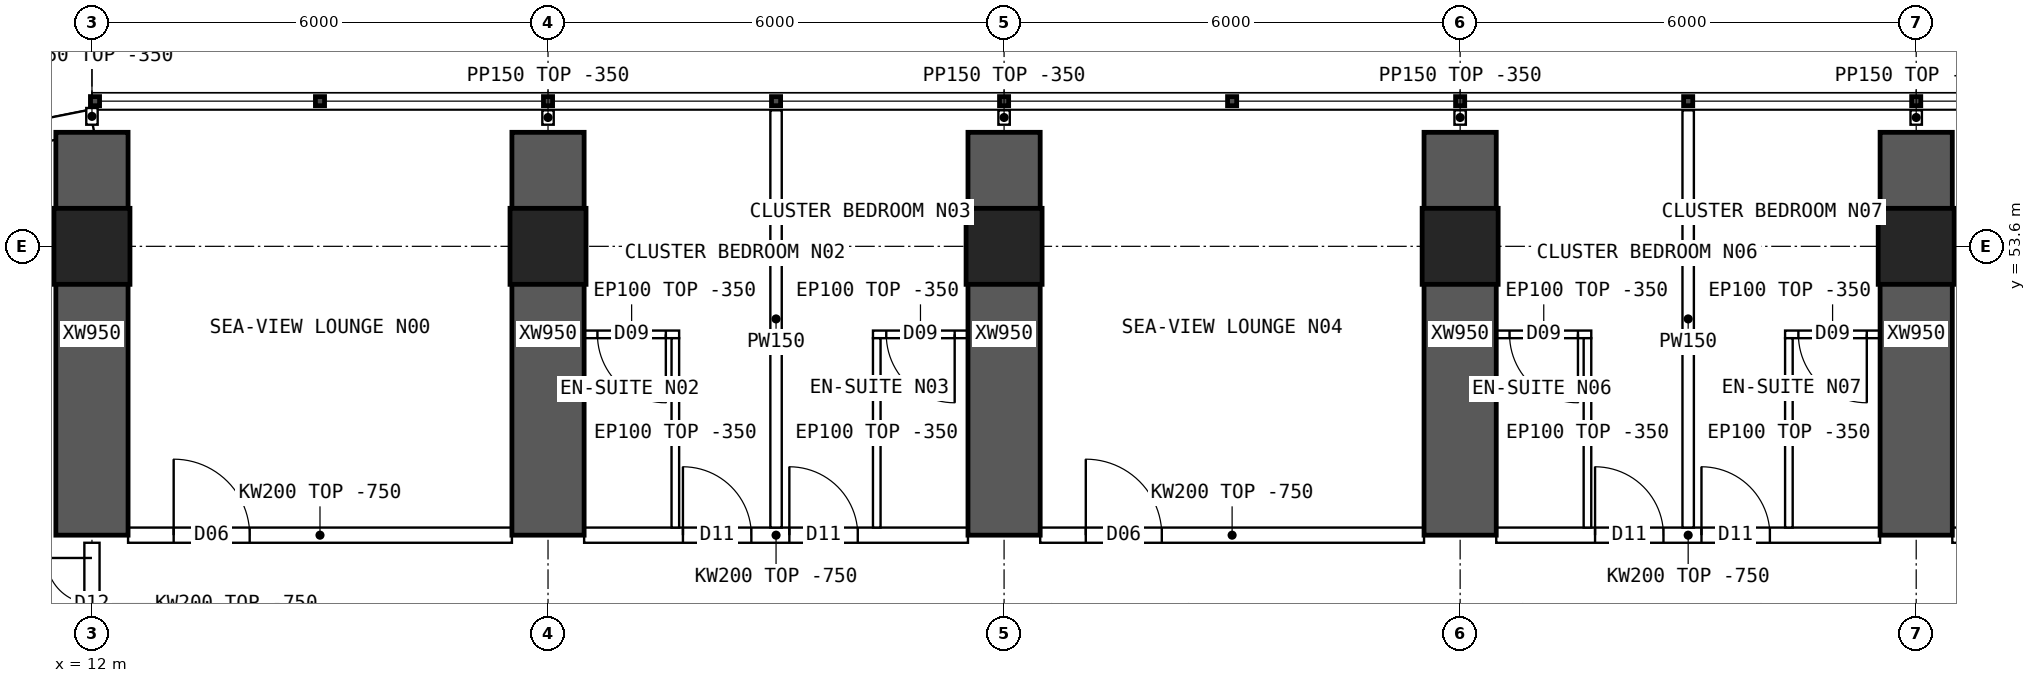
"""IFC4 building model, lengths in metres.
Left out: names, types, materials, properties, quantities, classifications, styles, units other than length and angle.
Written with IfcOpenShell. Run it as: python <this file> out.ifc"""

import sys

from ifc_helpers import new_model, si_unit, direction, frame, frame_2d, origin, origin_2d, place, context, subcontext, project, spatial, polyline, rectangle, hollow_rectangle, outline, extrude, element, fill, save


model = new_model("IFC4")
c1 = context("Model", 3, precision=1e-05, world=origin(), true_north=direction((0.0, 1.0)))
c2 = subcontext(c1, "Body", "Model", "MODEL_VIEW")
j1 = project(units=[si_unit("LENGTHUNIT", "METRE"), si_unit("PLANEANGLEUNIT", "RADIAN")], contexts=[c1])
p1 = place(None, origin())
s1 = spatial("IfcSite", under=j1, at=p1, CompositionType="ELEMENT")
p2 = place(p1, origin())
s2 = spatial("IfcBuilding", under=s1, at=p2, CompositionType="ELEMENT")
p3 = place(p2, frame((0.0, 0.0, 129.4)))
s3 = spatial("IfcBuildingStorey", under=s2, at=p3, CompositionType="ELEMENT", Elevation=129.4)
for number, where, z_axis, x_axis in (
    (1, (12.0, 53.6, 0.0), (0.0, 0.0, 1.0), (1.0, 0.0, 0.0)),
    (2, (18.0, 53.6, 0.0), (0.0, 0.0, 1.0), (1.0, 0.0, 0.0)),
    (3, (24.0, 53.6, 0.0), (0.0, 0.0, 1.0), (1.0, 0.0, 0.0)),
    (4, (30.0, 53.6, 0.0), (0.0, 0.0, 1.0), (1.0, 0.0, 0.0)),
    (5, (36.0, 53.6, 0.0), (0.0, 0.0, 1.0), (1.0, 0.0, 0.0)),
):
    element("IfcColumn", number, at=place(p3, frame(where, z_axis=z_axis, x_axis=x_axis)), inside=s3, PredefinedType="COLUMN", context=c2, shape_type="SweptSolid", body=[
        extrude(hollow_rectangle(XDim=1.0, YDim=1.0, WallThickness=0.1, at=origin_2d()), origin(), (0.0, 0.0, 1.0), 3.75),
    ])
for number, where, z_axis, x_axis in (
    (6, (12.0, 49.8, 0.0), (0.0, 0.0, 1.0), (0.0, 1.0, 0.0)),
    (7, (18.0, 49.8, 0.0), (0.0, 0.0, 1.0), (0.0, 1.0, 0.0)),
    (8, (24.0, 49.8, 0.0), (0.0, 0.0, 1.0), (0.0, 1.0, 0.0)),
    (9, (30.0, 49.8, 0.0), (0.0, 0.0, 1.0), (0.0, 1.0, 0.0)),
    (10, (36.0, 49.8, 0.0), (0.0, 0.0, 1.0), (0.0, 1.0, 0.0)),
):
    element("IfcWall", number, at=place(p3, frame(where, z_axis=z_axis, x_axis=x_axis)), inside=s3, PredefinedType="SHEAR", context=c2, shape_type="SweptSolid", body=[
        extrude(rectangle(XDim=5.3, YDim=0.95, at=frame_2d((2.65, 0.0))), origin(), (0.0, 0.0, 1.0), 3.75),
    ])
p4 = place(p3, frame((12.0, 55.25, 0.0), z_axis=(0.0, 0.0, 1.0), x_axis=(-0.980787251524, -0.195080412259, 0.0)))
e11 = element("IfcWall", 11, at=p4, inside=s3, PredefinedType="SOLIDWALL", context=c2, shape_type="SweptSolid", body=[
    extrude(outline(polyline([(-0.03, -0.15), (3.249, -0.15), (3.189, 0.15), (0.03, 0.15), (-0.03, -0.15)])), origin(), (0.0, 0.0, 1.0), 3.4),
])
p5 = place(p4, frame((0.909, 0.0, 0.9)))
e12 = element("IfcOpeningElement", 12, at=p5, cuts=e11, PredefinedType="OPENING", context=c2, shape_type="SweptSolid", body=[
    extrude(rectangle(XDim=1.4, YDim=1.8, at=frame_2d((0.7, 0.9))), frame((0.0, 0.16, 0.0), z_axis=(0.0, -1.0, 0.0), x_axis=(1.0, 0.0, 0.0)), (0.0, 0.0, 1.0), 0.32),
])
p6 = place(p3, frame((12.475, 49.8, 0.0), z_axis=(0.0, 0.0, 1.0), x_axis=(1.0, 0.0, 0.0)))
e13 = element("IfcWall", 13, at=p6, inside=s3, PredefinedType="SOLIDWALL", context=c2, shape_type="SweptSolid", body=[
    extrude(outline(polyline([(0.0, 0.0), (5.05, 0.0), (5.05, 3.0), (0.0, 3.0), (0.0, 0.0)])), frame((0.0, 0.1, 0.0), z_axis=(0.0, -1.0, 0.0), x_axis=(1.0, 0.0, 0.0)), (0.0, 0.0, 1.0), 0.2),
])
p7 = place(p6, frame((0.6, 0.0, 0.0)))
e14 = element("IfcOpeningElement", 14, at=p7, cuts=e13, PredefinedType="OPENING", context=c2, shape_type="SweptSolid", body=[
    extrude(rectangle(XDim=1.0, YDim=2.1, at=frame_2d((0.5, 1.05))), frame((0.0, 0.11, 0.0), z_axis=(0.0, -1.0, 0.0), x_axis=(1.0, 0.0, 0.0)), (0.0, 0.0, 1.0), 0.22),
])
p8 = place(p3, frame((18.475, 49.8, 0.0), z_axis=(0.0, 0.0, 1.0), x_axis=(1.0, 0.0, 0.0)))
e15 = element("IfcWall", 15, at=p8, inside=s3, PredefinedType="SOLIDWALL", context=c2, shape_type="SweptSolid", body=[
    extrude(outline(polyline([(0.0, 0.0), (5.05, 0.0), (5.05, 3.0), (0.0, 3.0), (0.0, 0.0)])), frame((0.0, 0.1, 0.0), z_axis=(0.0, -1.0, 0.0), x_axis=(1.0, 0.0, 0.0)), (0.0, 0.0, 1.0), 0.2),
])
p9 = place(p8, frame((1.3, 0.0, 0.0)))
e16 = element("IfcOpeningElement", 16, at=p9, cuts=e15, PredefinedType="OPENING", context=c2, shape_type="SweptSolid", body=[
    extrude(rectangle(XDim=0.9, YDim=2.1, at=frame_2d((0.45, 1.05))), frame((0.0, 0.11, 0.0), z_axis=(0.0, -1.0, 0.0), x_axis=(1.0, 0.0, 0.0)), (0.0, 0.0, 1.0), 0.22),
])
p10 = place(p8, frame((2.7, 0.0, 0.0)))
e17 = element("IfcOpeningElement", 17, at=p10, cuts=e15, PredefinedType="OPENING", context=c2, shape_type="SweptSolid", body=[
    extrude(rectangle(XDim=0.9, YDim=2.1, at=frame_2d((0.45, 1.05))), frame((0.0, 0.11, 0.0), z_axis=(0.0, -1.0, 0.0), x_axis=(1.0, 0.0, 0.0)), (0.0, 0.0, 1.0), 0.22),
])
p11 = place(p3, frame((24.475, 49.8, 0.0), z_axis=(0.0, 0.0, 1.0), x_axis=(1.0, 0.0, 0.0)))
e18 = element("IfcWall", 18, at=p11, inside=s3, PredefinedType="SOLIDWALL", context=c2, shape_type="SweptSolid", body=[
    extrude(outline(polyline([(0.0, 0.0), (5.05, 0.0), (5.05, 3.0), (0.0, 3.0), (0.0, 0.0)])), frame((0.0, 0.1, 0.0), z_axis=(0.0, -1.0, 0.0), x_axis=(1.0, 0.0, 0.0)), (0.0, 0.0, 1.0), 0.2),
])
p12 = place(p11, frame((0.6, 0.0, 0.0)))
e19 = element("IfcOpeningElement", 19, at=p12, cuts=e18, PredefinedType="OPENING", context=c2, shape_type="SweptSolid", body=[
    extrude(rectangle(XDim=1.0, YDim=2.1, at=frame_2d((0.5, 1.05))), frame((0.0, 0.11, 0.0), z_axis=(0.0, -1.0, 0.0), x_axis=(1.0, 0.0, 0.0)), (0.0, 0.0, 1.0), 0.22),
])
p13 = place(p3, frame((30.475, 49.8, 0.0), z_axis=(0.0, 0.0, 1.0), x_axis=(1.0, 0.0, 0.0)))
e20 = element("IfcWall", 20, at=p13, inside=s3, PredefinedType="SOLIDWALL", context=c2, shape_type="SweptSolid", body=[
    extrude(outline(polyline([(0.0, 0.0), (5.05, 0.0), (5.05, 3.0), (0.0, 3.0), (0.0, 0.0)])), frame((0.0, 0.1, 0.0), z_axis=(0.0, -1.0, 0.0), x_axis=(1.0, 0.0, 0.0)), (0.0, 0.0, 1.0), 0.2),
])
p14 = place(p13, frame((1.3, 0.0, 0.0)))
e21 = element("IfcOpeningElement", 21, at=p14, cuts=e20, PredefinedType="OPENING", context=c2, shape_type="SweptSolid", body=[
    extrude(rectangle(XDim=0.9, YDim=2.1, at=frame_2d((0.45, 1.05))), frame((0.0, 0.11, 0.0), z_axis=(0.0, -1.0, 0.0), x_axis=(1.0, 0.0, 0.0)), (0.0, 0.0, 1.0), 0.22),
])
p15 = place(p13, frame((2.7, 0.0, 0.0)))
e22 = element("IfcOpeningElement", 22, at=p15, cuts=e20, PredefinedType="OPENING", context=c2, shape_type="SweptSolid", body=[
    extrude(rectangle(XDim=0.9, YDim=2.1, at=frame_2d((0.45, 1.05))), frame((0.0, 0.11, 0.0), z_axis=(0.0, -1.0, 0.0), x_axis=(1.0, 0.0, 0.0)), (0.0, 0.0, 1.0), 0.22),
])
p16 = place(p3, frame((36.475, 49.8, 0.0), z_axis=(0.0, 0.0, 1.0), x_axis=(1.0, 0.0, 0.0)))
e23 = element("IfcWall", 23, at=p16, inside=s3, PredefinedType="SOLIDWALL", context=c2, shape_type="SweptSolid", body=[
    extrude(outline(polyline([(0.0, 0.0), (5.05, 0.0), (5.05, 3.0), (0.0, 3.0), (0.0, 0.0)])), frame((0.0, 0.1, 0.0), z_axis=(0.0, -1.0, 0.0), x_axis=(1.0, 0.0, 0.0)), (0.0, 0.0, 1.0), 0.2),
])
p17 = place(p16, frame((0.3, 0.0, 0.0)))
e24 = element("IfcOpeningElement", 24, at=p17, cuts=e23, PredefinedType="OPENING", context=c2, shape_type="SweptSolid", body=[
    extrude(rectangle(XDim=1.0, YDim=2.1, at=frame_2d((0.5, 1.05))), frame((0.0, 0.11, 0.0), z_axis=(0.0, -1.0, 0.0), x_axis=(1.0, 0.0, 0.0)), (0.0, 0.0, 1.0), 0.22),
])
p18 = place(p3, frame((21.0, 55.39, 0.0), z_axis=(0.0, 0.0, 1.0), x_axis=(0.0, -1.0, 0.0)))
e25 = element("IfcWall", 25, at=p18, inside=s3, PredefinedType="PARTITIONING", context=c2, shape_type="SweptSolid", body=[
    extrude(outline(polyline([(0.0, 0.0), (5.49, 0.0), (5.49, 3.0), (5.442, 3.0), (5.44, 3.4), (1.992, 3.4), (1.99, 3.0), (1.592, 3.0), (1.59, 3.4), (0.0, 3.4), (0.0, 0.0)])), frame((0.0, 0.075, 0.0), z_axis=(0.0, -1.0, 0.0), x_axis=(1.0, 0.0, 0.0)), (0.0, 0.0, 1.0), 0.15),
])
p19 = place(p3, frame((18.475, 52.442, 0.0), z_axis=(0.0, 0.0, 1.0), x_axis=(1.0, 0.0, 0.0)))
e26 = element("IfcWall", 26, at=p19, inside=s3, PredefinedType="PARTITIONING", context=c2, shape_type="SweptSolid", body=[
    extrude(rectangle(XDim=1.25, YDim=0.1, at=frame_2d((0.625, 0.0))), origin(), (0.0, 0.0, 1.0), 3.4),
])
p20 = place(p19, frame((0.175, 0.0, 0.0)))
e27 = element("IfcOpeningElement", 27, at=p20, cuts=e26, PredefinedType="OPENING", context=c2, shape_type="SweptSolid", body=[
    extrude(rectangle(XDim=0.9, YDim=2.1, at=frame_2d((0.45, 1.05))), frame((0.0, 0.06, 0.0), z_axis=(0.0, -1.0, 0.0), x_axis=(1.0, 0.0, 0.0)), (0.0, 0.0, 1.0), 0.12),
])
p21 = place(p3, frame((19.675, 52.392, 0.0), z_axis=(0.0, 0.0, 1.0), x_axis=(0.0, -1.0, 0.0)))
e28 = element("IfcWall", 28, at=p21, inside=s3, PredefinedType="PARTITIONING", context=c2, shape_type="SweptSolid", body=[
    extrude(outline(polyline([(0.0, 0.0), (2.492, 0.0), (2.492, 3.0), (2.444, 3.0), (2.442, 3.4), (0.0, 3.4), (0.0, 0.0)])), frame((0.0, 0.05, 0.0), z_axis=(0.0, -1.0, 0.0), x_axis=(1.0, 0.0, 0.0)), (0.0, 0.0, 1.0), 0.1),
])
p22 = place(p3, frame((22.275, 52.442, 0.0), z_axis=(0.0, 0.0, 1.0), x_axis=(1.0, 0.0, 0.0)))
e29 = element("IfcWall", 29, at=p22, inside=s3, PredefinedType="PARTITIONING", context=c2, shape_type="SweptSolid", body=[
    extrude(rectangle(XDim=1.25, YDim=0.1, at=frame_2d((0.625, 0.0))), origin(), (0.0, 0.0, 1.0), 3.4),
])
p23 = place(p22, frame((0.175, 0.0, 0.0)))
e30 = element("IfcOpeningElement", 30, at=p23, cuts=e29, PredefinedType="OPENING", context=c2, shape_type="SweptSolid", body=[
    extrude(rectangle(XDim=0.9, YDim=2.1, at=frame_2d((0.45, 1.05))), frame((0.0, 0.06, 0.0), z_axis=(0.0, -1.0, 0.0), x_axis=(1.0, 0.0, 0.0)), (0.0, 0.0, 1.0), 0.12),
])
p24 = place(p3, frame((22.325, 52.392, 0.0), z_axis=(0.0, 0.0, 1.0), x_axis=(0.0, -1.0, 0.0)))
e31 = element("IfcWall", 31, at=p24, inside=s3, PredefinedType="PARTITIONING", context=c2, shape_type="SweptSolid", body=[
    extrude(outline(polyline([(0.0, 0.0), (2.492, 0.0), (2.492, 3.0), (2.444, 3.0), (2.442, 3.4), (0.0, 3.4), (0.0, 0.0)])), frame((0.0, 0.05, 0.0), z_axis=(0.0, -1.0, 0.0), x_axis=(1.0, 0.0, 0.0)), (0.0, 0.0, 1.0), 0.1),
])
p25 = place(p3, frame((33.0, 55.39, 0.0), z_axis=(0.0, 0.0, 1.0), x_axis=(0.0, -1.0, 0.0)))
e32 = element("IfcWall", 32, at=p25, inside=s3, PredefinedType="PARTITIONING", context=c2, shape_type="SweptSolid", body=[
    extrude(outline(polyline([(0.0, 0.0), (5.49, 0.0), (5.49, 3.0), (5.442, 3.0), (5.44, 3.4), (1.992, 3.4), (1.99, 3.0), (1.592, 3.0), (1.59, 3.4), (0.0, 3.4), (0.0, 0.0)])), frame((0.0, 0.075, 0.0), z_axis=(0.0, -1.0, 0.0), x_axis=(1.0, 0.0, 0.0)), (0.0, 0.0, 1.0), 0.15),
])
p26 = place(p3, frame((30.475, 52.442, 0.0), z_axis=(0.0, 0.0, 1.0), x_axis=(1.0, 0.0, 0.0)))
e33 = element("IfcWall", 33, at=p26, inside=s3, PredefinedType="PARTITIONING", context=c2, shape_type="SweptSolid", body=[
    extrude(rectangle(XDim=1.25, YDim=0.1, at=frame_2d((0.625, 0.0))), origin(), (0.0, 0.0, 1.0), 3.4),
])
p27 = place(p26, frame((0.175, 0.0, 0.0)))
e34 = element("IfcOpeningElement", 34, at=p27, cuts=e33, PredefinedType="OPENING", context=c2, shape_type="SweptSolid", body=[
    extrude(rectangle(XDim=0.9, YDim=2.1, at=frame_2d((0.45, 1.05))), frame((0.0, 0.06, 0.0), z_axis=(0.0, -1.0, 0.0), x_axis=(1.0, 0.0, 0.0)), (0.0, 0.0, 1.0), 0.12),
])
p28 = place(p3, frame((31.675, 52.392, 0.0), z_axis=(0.0, 0.0, 1.0), x_axis=(0.0, -1.0, 0.0)))
e35 = element("IfcWall", 35, at=p28, inside=s3, PredefinedType="PARTITIONING", context=c2, shape_type="SweptSolid", body=[
    extrude(outline(polyline([(0.0, 0.0), (2.492, 0.0), (2.492, 3.0), (2.444, 3.0), (2.442, 3.4), (0.0, 3.4), (0.0, 0.0)])), frame((0.0, 0.05, 0.0), z_axis=(0.0, -1.0, 0.0), x_axis=(1.0, 0.0, 0.0)), (0.0, 0.0, 1.0), 0.1),
])
p29 = place(p3, frame((34.275, 52.442, 0.0), z_axis=(0.0, 0.0, 1.0), x_axis=(1.0, 0.0, 0.0)))
e36 = element("IfcWall", 36, at=p29, inside=s3, PredefinedType="PARTITIONING", context=c2, shape_type="SweptSolid", body=[
    extrude(rectangle(XDim=1.25, YDim=0.1, at=frame_2d((0.625, 0.0))), origin(), (0.0, 0.0, 1.0), 3.4),
])
p30 = place(p29, frame((0.175, 0.0, 0.0)))
e37 = element("IfcOpeningElement", 37, at=p30, cuts=e36, PredefinedType="OPENING", context=c2, shape_type="SweptSolid", body=[
    extrude(rectangle(XDim=0.9, YDim=2.1, at=frame_2d((0.45, 1.05))), frame((0.0, 0.06, 0.0), z_axis=(0.0, -1.0, 0.0), x_axis=(1.0, 0.0, 0.0)), (0.0, 0.0, 1.0), 0.12),
])
p31 = place(p3, frame((34.325, 52.392, 0.0), z_axis=(0.0, 0.0, 1.0), x_axis=(0.0, -1.0, 0.0)))
e38 = element("IfcWall", 38, at=p31, inside=s3, PredefinedType="PARTITIONING", context=c2, shape_type="SweptSolid", body=[
    extrude(outline(polyline([(0.0, 0.0), (2.492, 0.0), (2.492, 3.0), (2.444, 3.0), (2.442, 3.4), (0.0, 3.4), (0.0, 0.0)])), frame((0.0, 0.05, 0.0), z_axis=(0.0, -1.0, 0.0), x_axis=(1.0, 0.0, 0.0)), (0.0, 0.0, 1.0), 0.1),
])
p32 = place(p3, frame((12.0, 48.1, 0.0), z_axis=(0.0, 0.0, 1.0), x_axis=(0.0, 1.0, 0.0)))
e39 = element("IfcWall", 39, at=p32, inside=s3, PredefinedType="SOLIDWALL", context=c2, shape_type="SweptSolid", body=[
    extrude(outline(polyline([(0.0, 0.0), (1.6, 0.0), (1.6, 3.0), (0.0, 3.0), (0.0, 0.0)])), frame((0.0, 0.1, 0.0), z_axis=(0.0, -1.0, 0.0), x_axis=(1.0, 0.0, 0.0)), (0.0, 0.0, 1.0), 0.2),
])
p33 = place(p32, frame((0.2, 0.0, 0.0)))
e40 = element("IfcOpeningElement", 40, at=p33, cuts=e39, PredefinedType="OPENING", context=c2, shape_type="SweptSolid", body=[
    extrude(rectangle(XDim=1.2, YDim=2.1, at=frame_2d((0.6, 1.05))), frame((0.0, 0.11, 0.0), z_axis=(0.0, -1.0, 0.0), x_axis=(1.0, 0.0, 0.0)), (0.0, 0.0, 1.0), 0.22),
])
p34 = place(p3, frame((12.0, 55.2, 0.0), z_axis=(0.0, 0.0, 1.0), x_axis=(0.0, 1.0, 0.0)))
e41 = element("IfcWall", 41, at=p34, inside=s3, PredefinedType="PARTITIONING", context=c2, shape_type="SweptSolid", body=[
    extrude(rectangle(XDim=0.22, YDim=0.15, at=frame_2d((0.11, 0.0))), origin(), (0.0, 0.0, 1.0), 3.4),
])
for number, where, z_axis, x_axis in (
    (42, (18.0, 55.2, 0.0), (0.0, 0.0, 1.0), (0.0, 1.0, 0.0)),
    (43, (24.0, 55.2, 0.0), (0.0, 0.0, 1.0), (0.0, 1.0, 0.0)),
    (44, (30.0, 55.2, 0.0), (0.0, 0.0, 1.0), (0.0, 1.0, 0.0)),
    (45, (36.0, 55.2, 0.0), (0.0, 0.0, 1.0), (0.0, 1.0, 0.0)),
):
    element("IfcWall", number, at=place(p3, frame(where, z_axis=z_axis, x_axis=x_axis)), inside=s3, PredefinedType="PARTITIONING", context=c2, shape_type="SweptSolid", body=[
        extrude(rectangle(XDim=0.19, YDim=0.15, at=frame_2d((0.095, 0.0))), origin(), (0.0, 0.0, 1.0), 3.4),
    ])
p35 = place(p7, origin())
e46 = element("IfcDoor", 46, at=p35, inside=s3, OperationType="SINGLE_SWING_LEFT", PredefinedType="DOOR", context=c2, shape_type="SweptSolid", body=[
    extrude(rectangle(XDim=1.0, YDim=2.1, at=frame_2d((0.5, 1.05))), frame((0.0, 0.025, 0.0), z_axis=(0.0, -1.0, 0.0), x_axis=(1.0, 0.0, 0.0)), (0.0, 0.0, 1.0), 0.05),
])
fill(e14, e46)
p36 = place(p20, origin())
e47 = element("IfcDoor", 47, at=p36, inside=s3, OperationType="SINGLE_SWING_RIGHT", PredefinedType="DOOR", context=c2, shape_type="SweptSolid", body=[
    extrude(rectangle(XDim=0.9, YDim=2.1, at=frame_2d((0.45, 1.05))), frame((0.0, 0.025, 0.0), z_axis=(0.0, -1.0, 0.0), x_axis=(1.0, 0.0, 0.0)), (0.0, 0.0, 1.0), 0.05),
])
fill(e27, e47)
p37 = place(p9, origin())
e48 = element("IfcDoor", 48, at=p37, inside=s3, OperationType="SINGLE_SWING_LEFT", PredefinedType="DOOR", context=c2, shape_type="SweptSolid", body=[
    extrude(rectangle(XDim=0.9, YDim=2.1, at=frame_2d((0.45, 1.05))), frame((0.0, 0.025, 0.0), z_axis=(0.0, -1.0, 0.0), x_axis=(1.0, 0.0, 0.0)), (0.0, 0.0, 1.0), 0.05),
])
fill(e16, e48)
p38 = place(p23, origin())
e49 = element("IfcDoor", 49, at=p38, inside=s3, OperationType="SINGLE_SWING_RIGHT", PredefinedType="DOOR", context=c2, shape_type="SweptSolid", body=[
    extrude(rectangle(XDim=0.9, YDim=2.1, at=frame_2d((0.45, 1.05))), frame((0.0, 0.025, 0.0), z_axis=(0.0, -1.0, 0.0), x_axis=(1.0, 0.0, 0.0)), (0.0, 0.0, 1.0), 0.05),
])
fill(e30, e49)
p39 = place(p10, origin())
e50 = element("IfcDoor", 50, at=p39, inside=s3, OperationType="SINGLE_SWING_LEFT", PredefinedType="DOOR", context=c2, shape_type="SweptSolid", body=[
    extrude(rectangle(XDim=0.9, YDim=2.1, at=frame_2d((0.45, 1.05))), frame((0.0, 0.025, 0.0), z_axis=(0.0, -1.0, 0.0), x_axis=(1.0, 0.0, 0.0)), (0.0, 0.0, 1.0), 0.05),
])
fill(e17, e50)
p40 = place(p12, origin())
e51 = element("IfcDoor", 51, at=p40, inside=s3, OperationType="SINGLE_SWING_LEFT", PredefinedType="DOOR", context=c2, shape_type="SweptSolid", body=[
    extrude(rectangle(XDim=1.0, YDim=2.1, at=frame_2d((0.5, 1.05))), frame((0.0, 0.025, 0.0), z_axis=(0.0, -1.0, 0.0), x_axis=(1.0, 0.0, 0.0)), (0.0, 0.0, 1.0), 0.05),
])
fill(e19, e51)
p41 = place(p27, origin())
e52 = element("IfcDoor", 52, at=p41, inside=s3, OperationType="SINGLE_SWING_RIGHT", PredefinedType="DOOR", context=c2, shape_type="SweptSolid", body=[
    extrude(rectangle(XDim=0.9, YDim=2.1, at=frame_2d((0.45, 1.05))), frame((0.0, 0.025, 0.0), z_axis=(0.0, -1.0, 0.0), x_axis=(1.0, 0.0, 0.0)), (0.0, 0.0, 1.0), 0.05),
])
fill(e34, e52)
p42 = place(p14, origin())
e53 = element("IfcDoor", 53, at=p42, inside=s3, OperationType="SINGLE_SWING_LEFT", PredefinedType="DOOR", context=c2, shape_type="SweptSolid", body=[
    extrude(rectangle(XDim=0.9, YDim=2.1, at=frame_2d((0.45, 1.05))), frame((0.0, 0.025, 0.0), z_axis=(0.0, -1.0, 0.0), x_axis=(1.0, 0.0, 0.0)), (0.0, 0.0, 1.0), 0.05),
])
fill(e21, e53)
p43 = place(p30, origin())
e54 = element("IfcDoor", 54, at=p43, inside=s3, OperationType="SINGLE_SWING_RIGHT", PredefinedType="DOOR", context=c2, shape_type="SweptSolid", body=[
    extrude(rectangle(XDim=0.9, YDim=2.1, at=frame_2d((0.45, 1.05))), frame((0.0, 0.025, 0.0), z_axis=(0.0, -1.0, 0.0), x_axis=(1.0, 0.0, 0.0)), (0.0, 0.0, 1.0), 0.05),
])
fill(e37, e54)
p44 = place(p15, origin())
e55 = element("IfcDoor", 55, at=p44, inside=s3, OperationType="SINGLE_SWING_LEFT", PredefinedType="DOOR", context=c2, shape_type="SweptSolid", body=[
    extrude(rectangle(XDim=0.9, YDim=2.1, at=frame_2d((0.45, 1.05))), frame((0.0, 0.025, 0.0), z_axis=(0.0, -1.0, 0.0), x_axis=(1.0, 0.0, 0.0)), (0.0, 0.0, 1.0), 0.05),
])
fill(e22, e55)
p45 = place(p33, origin())
e56 = element("IfcDoor", 56, at=p45, inside=s3, OperationType="DOUBLE_DOOR_SINGLE_SWING", PredefinedType="DOOR", context=c2, shape_type="SweptSolid", body=[
    extrude(rectangle(XDim=1.2, YDim=2.1, at=frame_2d((0.6, 1.05))), frame((0.0, 0.025, 0.0), z_axis=(0.0, -1.0, 0.0), x_axis=(1.0, 0.0, 0.0)), (0.0, 0.0, 1.0), 0.05),
])
fill(e40, e56)
save(model, sys.argv[1])
